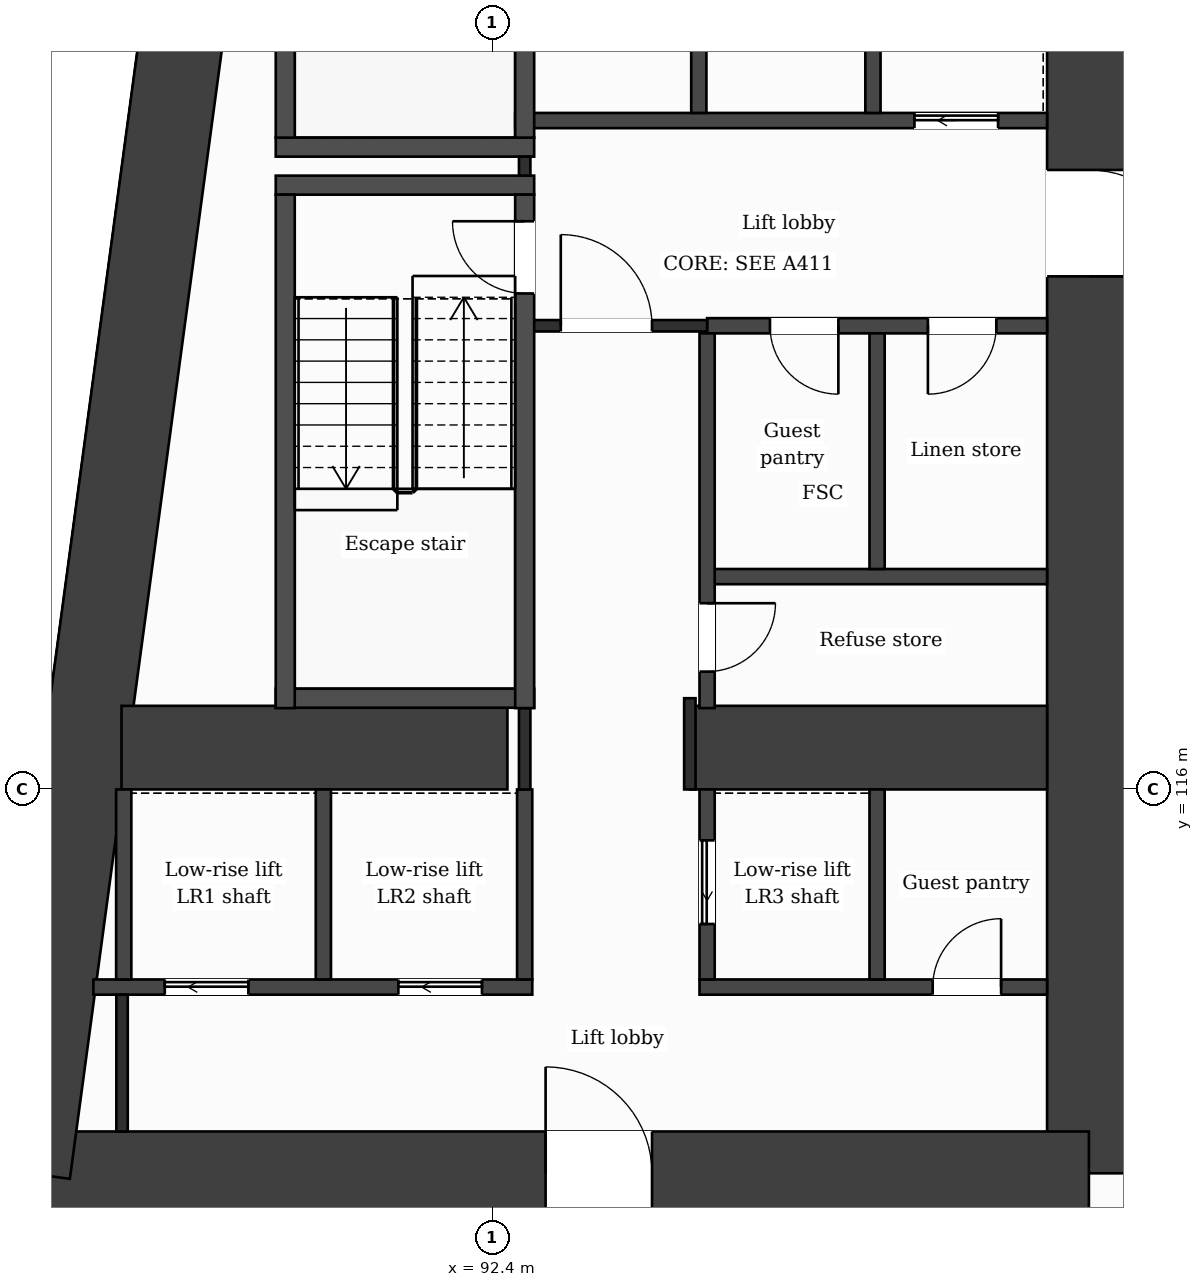
"""IFC4 building model, lengths in metres.
Left out: names, types, materials, properties, quantities, classifications, styles, units other than length and angle.
Written with IfcOpenShell. Run it as: python <this file> out.ifc"""

import sys

from ifc_helpers import new_model, si_unit, direction, frame, frame_2d, origin, place, context, subcontext, project, spatial, rectangle, extrude, element, fill, save


model = new_model("IFC4")
c1 = context("Model", 3, precision=1e-05, world=origin(), true_north=direction((0.0, 1.0)))
c2 = subcontext(c1, "Body", "Model", "MODEL_VIEW")
j1 = project(units=[si_unit("LENGTHUNIT", "METRE"), si_unit("PLANEANGLEUNIT", "RADIAN")], contexts=[c1])
p1 = place(None, origin())
s1 = spatial("IfcSite", under=j1, at=p1, CompositionType="ELEMENT")
p2 = place(p1, origin())
s2 = spatial("IfcBuilding", under=s1, at=p2, CompositionType="ELEMENT")
p3 = place(p2, frame((0.0, 0.0, 53.0)))
s3 = spatial("IfcBuildingStorey", under=s2, at=p3, CompositionType="ELEMENT", Elevation=53.0)
p4 = place(p3, frame((100.25, 131.85, 0.0), z_axis=(0.0, 0.0, 1.0), x_axis=(0.0, -1.0, 0.0)))
e1 = element("IfcWall", 1, at=p4, inside=s3, PredefinedType="SHEAR", context=c2, shape_type="SweptSolid", body=[
    extrude(rectangle(XDim=20.9, YDim=1.1, at=frame_2d((10.45, 0.0))), origin(), (0.0, 0.0, 1.0), 3.5),
])
p5 = place(p4, frame((7.7, 0.0, 0.0)))
e2 = element("IfcOpeningElement", 2, at=p5, cuts=e1, PredefinedType="OPENING", context=c2, shape_type="SweptSolid", body=[
    extrude(rectangle(XDim=1.4, YDim=2.1, at=frame_2d((0.7, 1.05))), frame((0.0, 0.56, 0.0), z_axis=(0.0, -1.0, 0.0), x_axis=(1.0, 0.0, 0.0)), (0.0, 0.0, 1.0), 1.12),
])
p6 = place(p3, frame((100.25, 110.95, 0.0), z_axis=(0.0, 0.0, 1.0), x_axis=(-1.0, 0.0, 0.0)))
e3 = element("IfcWall", 3, at=p6, inside=s3, PredefinedType="SHEAR", context=c2, shape_type="SweptSolid", body=[
    extrude(rectangle(XDim=13.952, YDim=1.1, at=frame_2d((6.976, 0.0))), origin(), (0.0, 0.0, 1.0), 3.5),
])
p7 = place(p6, frame((5.748, 0.0, 0.0)))
e4 = element("IfcOpeningElement", 4, at=p7, cuts=e3, PredefinedType="OPENING", context=c2, shape_type="SweptSolid", body=[
    extrude(rectangle(XDim=1.4, YDim=2.1, at=frame_2d((0.7, 1.05))), frame((0.0, 0.56, 0.0), z_axis=(0.0, -1.0, 0.0), x_axis=(1.0, 0.0, 0.0)), (0.0, 0.0, 1.0), 1.12),
])
p8 = place(p3, frame((86.298, 110.95, 0.0), z_axis=(0.0, 0.0, 1.0), x_axis=(0.133400422634, 0.99106222168, 0.0)))
e5 = element("IfcWall", 5, at=p8, inside=s3, PredefinedType="SHEAR", context=c2, shape_type="SweptSolid", body=[
    extrude(rectangle(XDim=21.089, YDim=1.1, at=frame_2d((10.544, 0.0))), origin(), (0.0, 0.0, 1.0), 3.5),
])
p9 = place(p3, frame((87.523, 116.55, 0.0), z_axis=(0.0, 0.0, 1.0), x_axis=(1.0, 0.0, 0.0)))
e6 = element("IfcWall", 6, at=p9, inside=s3, PredefinedType="SHEAR", context=c2, shape_type="SweptSolid", body=[
    extrude(rectangle(XDim=5.077, YDim=1.1, at=frame_2d((2.539, 0.0))), origin(), (0.0, 0.0, 1.0), 3.5),
])
p10 = place(p3, frame((95.0, 116.55, 0.0), z_axis=(0.0, 0.0, 1.0), x_axis=(1.0, 0.0, 0.0)))
e7 = element("IfcWall", 7, at=p10, inside=s3, PredefinedType="SHEAR", context=c2, shape_type="SweptSolid", body=[
    extrude(rectangle(XDim=4.7, YDim=1.1, at=frame_2d((2.35, 0.0))), origin(), (0.0, 0.0, 1.0), 3.5),
])
p11 = place(p3, frame((87.153, 113.4, 0.0), z_axis=(0.0, 0.0, 1.0), x_axis=(1.0, 0.0, 0.0)))
e8 = element("IfcWall", 8, at=p11, inside=s3, PredefinedType="PARTITIONING", context=c2, shape_type="SweptSolid", body=[
    extrude(rectangle(XDim=5.774, YDim=0.2, at=frame_2d((2.887, 0.0))), origin(), (0.0, 0.0, 1.0), 3.18),
])
p12 = place(p11, frame((0.939, 0.0, 0.0)))
e9 = element("IfcOpeningElement", 9, at=p12, cuts=e8, PredefinedType="OPENING", context=c2, shape_type="SweptSolid", body=[
    extrude(rectangle(XDim=1.1, YDim=2.1, at=frame_2d((0.55, 1.05))), frame((0.0, 0.11, 0.0), z_axis=(0.0, -1.0, 0.0), x_axis=(1.0, 0.0, 0.0)), (0.0, 0.0, 1.0), 0.22),
])
p13 = place(p11, frame((4.012, 0.0, 0.0)))
e10 = element("IfcOpeningElement", 10, at=p13, cuts=e8, PredefinedType="OPENING", context=c2, shape_type="SweptSolid", body=[
    extrude(rectangle(XDim=1.1, YDim=2.1, at=frame_2d((0.55, 1.05))), frame((0.0, 0.11, 0.0), z_axis=(0.0, -1.0, 0.0), x_axis=(1.0, 0.0, 0.0)), (0.0, 0.0, 1.0), 0.22),
])
p14 = place(p3, frame((95.127, 113.4, 0.0), z_axis=(0.0, 0.0, 1.0), x_axis=(1.0, 0.0, 0.0)))
e11 = element("IfcWall", 11, at=p14, inside=s3, PredefinedType="PARTITIONING", context=c2, shape_type="SweptSolid", body=[
    extrude(rectangle(XDim=4.573, YDim=0.2, at=frame_2d((2.287, 0.0))), origin(), (0.0, 0.0, 1.0), 3.18),
])
p15 = place(p14, frame((3.068, 0.0, 0.0)))
e12 = element("IfcOpeningElement", 12, at=p15, cuts=e11, PredefinedType="OPENING", context=c2, shape_type="SweptSolid", body=[
    extrude(rectangle(XDim=0.9, YDim=2.1, at=frame_2d((0.45, 1.05))), frame((0.0, 0.11, 0.0), z_axis=(0.0, -1.0, 0.0), x_axis=(1.0, 0.0, 0.0)), (0.0, 0.0, 1.0), 0.22),
])
p16 = place(p3, frame((89.552, 117.2, 0.0), z_axis=(0.0, 0.0, 1.0), x_axis=(1.0, 0.0, 0.0)))
e13 = element("IfcWall", 13, at=p16, inside=s3, PredefinedType="PARTITIONING", context=c2, shape_type="SweptSolid", body=[
    extrude(rectangle(XDim=3.4, YDim=0.25, at=frame_2d((1.7, 0.0))), origin(), (0.0, 0.0, 1.0), 3.18),
])
p17 = place(p3, frame((95.227, 118.8, 0.0), z_axis=(0.0, 0.0, 1.0), x_axis=(1.0, 0.0, 0.0)))
e14 = element("IfcWall", 14, at=p17, inside=s3, PredefinedType="PARTITIONING", context=c2, shape_type="SweptSolid", body=[
    extrude(rectangle(XDim=4.473, YDim=0.2, at=frame_2d((2.236, 0.0))), origin(), (0.0, 0.0, 1.0), 3.18),
])
p18 = place(p3, frame((95.227, 122.1, 0.0), z_axis=(0.0, 0.0, 1.0), x_axis=(1.0, 0.0, 0.0)))
e15 = element("IfcWall", 15, at=p18, inside=s3, PredefinedType="PARTITIONING", context=c2, shape_type="SweptSolid", body=[
    extrude(rectangle(XDim=4.473, YDim=0.2, at=frame_2d((2.236, 0.0))), origin(), (0.0, 0.0, 1.0), 3.18),
])
p19 = place(p18, frame((0.827, 0.0, 0.0)))
e16 = element("IfcOpeningElement", 16, at=p19, cuts=e15, PredefinedType="OPENING", context=c2, shape_type="SweptSolid", body=[
    extrude(rectangle(XDim=0.9, YDim=2.1, at=frame_2d((0.45, 1.05))), frame((0.0, 0.11, 0.0), z_axis=(0.0, -1.0, 0.0), x_axis=(1.0, 0.0, 0.0)), (0.0, 0.0, 1.0), 0.22),
])
p20 = place(p18, frame((2.905, 0.0, 0.0)))
e17 = element("IfcOpeningElement", 17, at=p20, cuts=e15, PredefinedType="OPENING", context=c2, shape_type="SweptSolid", body=[
    extrude(rectangle(XDim=0.9, YDim=2.1, at=frame_2d((0.45, 1.05))), frame((0.0, 0.11, 0.0), z_axis=(0.0, -1.0, 0.0), x_axis=(1.0, 0.0, 0.0)), (0.0, 0.0, 1.0), 0.22),
])
p21 = place(p3, frame((92.827, 122.1, 0.0), z_axis=(0.0, 0.0, 1.0), x_axis=(1.0, 0.0, 0.0)))
e18 = element("IfcWall", 18, at=p21, inside=s3, PredefinedType="PARTITIONING", context=c2, shape_type="SweptSolid", body=[
    extrude(rectangle(XDim=2.4, YDim=0.15, at=frame_2d((1.2, 0.0))), origin(), (0.0, 0.0, 1.0), 3.18),
])
p22 = place(p21, frame((0.475, 0.0, 0.0)))
e19 = element("IfcOpeningElement", 19, at=p22, cuts=e18, PredefinedType="OPENING", context=c2, shape_type="SweptSolid", body=[
    extrude(rectangle(XDim=1.2, YDim=2.1, at=frame_2d((0.6, 1.05))), frame((0.0, 0.085, 0.0), z_axis=(0.0, -1.0, 0.0), x_axis=(1.0, 0.0, 0.0)), (0.0, 0.0, 1.0), 0.17),
])
for number, where, z_axis, x_axis in (
    (20, (89.552, 123.95, 0.0), (0.0, 0.0, 1.0), (1.0, 0.0, 0.0)),
    (21, (89.552, 124.45, 0.0), (0.0, 0.0, 1.0), (1.0, 0.0, 0.0)),
):
    element("IfcWall", number, at=place(p3, frame(where, z_axis=z_axis, x_axis=x_axis)), inside=s3, PredefinedType="PARTITIONING", context=c2, shape_type="SweptSolid", body=[
        extrude(rectangle(XDim=3.4, YDim=0.25, at=frame_2d((1.7, 0.0))), origin(), (0.0, 0.0, 1.0), 3.18),
    ])
p23 = place(p3, frame((92.702, 124.8, 0.0), z_axis=(0.0, 0.0, 1.0), x_axis=(1.0, 0.0, 0.0)))
e22 = element("IfcWall", 22, at=p23, inside=s3, PredefinedType="PARTITIONING", context=c2, shape_type="SweptSolid", body=[
    extrude(rectangle(XDim=6.998, YDim=0.2, at=frame_2d((3.499, 0.0))), origin(), (0.0, 0.0, 1.0), 3.18),
])
p24 = place(p23, frame((5.253, 0.0, 0.0)))
e23 = element("IfcOpeningElement", 23, at=p24, cuts=e22, PredefinedType="OPENING", context=c2, shape_type="SweptSolid", body=[
    extrude(rectangle(XDim=1.1, YDim=2.1, at=frame_2d((0.55, 1.05))), frame((0.0, 0.11, 0.0), z_axis=(0.0, -1.0, 0.0), x_axis=(1.0, 0.0, 0.0)), (0.0, 0.0, 1.0), 0.22),
])
p25 = place(p3, frame((87.552, 113.5, 0.0), z_axis=(0.0, 0.0, 1.0), x_axis=(0.0, 1.0, 0.0)))
e24 = element("IfcWall", 24, at=p25, inside=s3, PredefinedType="PARTITIONING", context=c2, shape_type="SweptSolid", body=[
    extrude(rectangle(XDim=2.5, YDim=0.2, at=frame_2d((1.25, 0.0))), origin(), (0.0, 0.0, 1.0), 3.18),
])
p26 = place(p3, frame((87.53, 111.5, 0.0), z_axis=(0.0, 0.0, 1.0), x_axis=(0.0, 1.0, 0.0)))
e25 = element("IfcWall", 25, at=p26, inside=s3, PredefinedType="PARTITIONING", context=c2, shape_type="SweptSolid", body=[
    extrude(rectangle(XDim=1.8, YDim=0.15, at=frame_2d((0.9, 0.0))), origin(), (0.0, 0.0, 1.0), 3.18),
])
p27 = place(p3, frame((89.677, 117.07, 0.0), z_axis=(0.0, 0.0, 1.0), x_axis=(0.0, 1.0, 0.0)))
e26 = element("IfcWall", 26, at=p27, inside=s3, PredefinedType="PARTITIONING", context=c2, shape_type="SweptSolid", body=[
    extrude(rectangle(XDim=6.755, YDim=0.25, at=frame_2d((3.377, 0.0))), origin(), (0.0, 0.0, 1.0), 3.18),
])
p28 = place(p3, frame((89.677, 124.575, 0.0), z_axis=(0.0, 0.0, 1.0), x_axis=(0.0, 1.0, 0.0)))
e27 = element("IfcWall", 27, at=p28, inside=s3, PredefinedType="PARTITIONING", context=c2, shape_type="SweptSolid", body=[
    extrude(rectangle(XDim=6.5, YDim=0.25, at=frame_2d((3.25, 0.0))), origin(), (0.0, 0.0, 1.0), 3.18),
])
for number, where, z_axis, x_axis in (
    (28, (90.178, 113.5, 0.0), (0.0, 0.0, 1.0), (0.0, 1.0, 0.0)),
    (29, (92.827, 113.5, 0.0), (0.0, 0.0, 1.0), (0.0, 1.0, 0.0)),
):
    element("IfcWall", number, at=place(p3, frame(where, z_axis=z_axis, x_axis=x_axis)), inside=s3, PredefinedType="PARTITIONING", context=c2, shape_type="SweptSolid", body=[
        extrude(rectangle(XDim=2.5, YDim=0.2, at=frame_2d((1.25, 0.0))), origin(), (0.0, 0.0, 1.0), 3.18),
    ])
p29 = place(p3, frame((92.827, 116.0, 0.0), z_axis=(0.0, 0.0, 1.0), x_axis=(0.0, 1.0, 0.0)))
e30 = element("IfcWall", 30, at=p29, inside=s3, PredefinedType="PARTITIONING", context=c2, shape_type="SweptSolid", body=[
    extrude(rectangle(XDim=1.07, YDim=0.15, at=frame_2d((0.535, 0.0))), origin(), (0.0, 0.0, 1.0), 3.18),
])
p30 = place(p3, frame((92.827, 124.075, 0.0), z_axis=(0.0, 0.0, 1.0), x_axis=(0.0, 1.0, 0.0)))
e31 = element("IfcWall", 31, at=p30, inside=s3, PredefinedType="PARTITIONING", context=c2, shape_type="SweptSolid", body=[
    extrude(rectangle(XDim=0.25, YDim=0.15, at=frame_2d((0.125, 0.0))), origin(), (0.0, 0.0, 1.0), 3.18),
])
p31 = place(p3, frame((92.827, 117.07, 0.0), z_axis=(0.0, 0.0, 1.0), x_axis=(0.0, 1.0, 0.0)))
e32 = element("IfcWall", 32, at=p31, inside=s3, PredefinedType="PARTITIONING", context=c2, shape_type="SweptSolid", body=[
    extrude(rectangle(XDim=6.755, YDim=0.25, at=frame_2d((3.377, 0.0))), origin(), (0.0, 0.0, 1.0), 3.18),
])
p32 = place(p31, frame((5.455, 0.0, 0.0)))
e33 = element("IfcOpeningElement", 33, at=p32, cuts=e32, PredefinedType="OPENING", context=c2, shape_type="SweptSolid", body=[
    extrude(rectangle(XDim=0.95, YDim=2.1, at=frame_2d((0.475, 1.05))), frame((0.0, 0.135, 0.0), z_axis=(0.0, -1.0, 0.0), x_axis=(1.0, 0.0, 0.0)), (0.0, 0.0, 1.0), 0.27),
])
p33 = place(p3, frame((92.827, 124.575, 0.0), z_axis=(0.0, 0.0, 1.0), x_axis=(0.0, 1.0, 0.0)))
e34 = element("IfcWall", 34, at=p33, inside=s3, PredefinedType="PARTITIONING", context=c2, shape_type="SweptSolid", body=[
    extrude(rectangle(XDim=6.755, YDim=0.25, at=frame_2d((3.377, 0.0))), origin(), (0.0, 0.0, 1.0), 3.18),
])
p34 = place(p33, frame((5.325, 0.0, 0.0)))
e35 = element("IfcOpeningElement", 35, at=p34, cuts=e34, PredefinedType="OPENING", context=c2, shape_type="SweptSolid", body=[
    extrude(rectangle(XDim=1.0, YDim=2.1, at=frame_2d((0.5, 1.05))), frame((0.0, 0.135, 0.0), z_axis=(0.0, -1.0, 0.0), x_axis=(1.0, 0.0, 0.0)), (0.0, 0.0, 1.0), 0.27),
])
p35 = place(p3, frame((95.0, 116.0, 0.0), z_axis=(0.0, 0.0, 1.0), x_axis=(0.0, 1.0, 0.0)))
e36 = element("IfcWall", 36, at=p35, inside=s3, PredefinedType="PARTITIONING", context=c2, shape_type="SweptSolid", body=[
    extrude(rectangle(XDim=1.2, YDim=0.15, at=frame_2d((0.6, 0.0))), origin(), (0.0, 0.0, 1.0), 3.18),
])
p36 = place(p3, frame((95.118, 124.9, 0.0), z_axis=(0.0, 0.0, 1.0), x_axis=(0.0, 1.0, 0.0)))
e37 = element("IfcWall", 37, at=p36, inside=s3, PredefinedType="PARTITIONING", context=c2, shape_type="SweptSolid", body=[
    extrude(rectangle(XDim=3.1, YDim=0.2, at=frame_2d((1.55, 0.0))), origin(), (0.0, 0.0, 1.0), 3.18),
])
p37 = place(p3, frame((95.227, 113.5, 0.0), z_axis=(0.0, 0.0, 1.0), x_axis=(0.0, 1.0, 0.0)))
e38 = element("IfcWall", 38, at=p37, inside=s3, PredefinedType="PARTITIONING", context=c2, shape_type="SweptSolid", body=[
    extrude(rectangle(XDim=2.5, YDim=0.2, at=frame_2d((1.25, 0.0))), origin(), (0.0, 0.0, 1.0), 3.18),
])
p38 = place(p37, frame((0.73, 0.0, 0.0)))
e39 = element("IfcOpeningElement", 39, at=p38, cuts=e38, PredefinedType="OPENING", context=c2, shape_type="SweptSolid", body=[
    extrude(rectangle(XDim=1.1, YDim=2.1, at=frame_2d((0.55, 1.05))), frame((0.0, 0.11, 0.0), z_axis=(0.0, -1.0, 0.0), x_axis=(1.0, 0.0, 0.0)), (0.0, 0.0, 1.0), 0.22),
])
p39 = place(p3, frame((95.227, 117.07, 0.0), z_axis=(0.0, 0.0, 1.0), x_axis=(0.0, 1.0, 0.0)))
e40 = element("IfcWall", 40, at=p39, inside=s3, PredefinedType="PARTITIONING", context=c2, shape_type="SweptSolid", body=[
    extrude(rectangle(XDim=4.93, YDim=0.2, at=frame_2d((2.465, 0.0))), origin(), (0.0, 0.0, 1.0), 3.18),
])
p40 = place(p39, frame((0.48, 0.0, 0.0)))
e41 = element("IfcOpeningElement", 41, at=p40, cuts=e40, PredefinedType="OPENING", context=c2, shape_type="SweptSolid", body=[
    extrude(rectangle(XDim=0.9, YDim=2.1, at=frame_2d((0.45, 1.05))), frame((0.0, 0.11, 0.0), z_axis=(0.0, -1.0, 0.0), x_axis=(1.0, 0.0, 0.0)), (0.0, 0.0, 1.0), 0.22),
])
p41 = place(p3, frame((97.409, 124.9, 0.0), z_axis=(0.0, 0.0, 1.0), x_axis=(0.0, 1.0, 0.0)))
e42 = element("IfcWall", 42, at=p41, inside=s3, PredefinedType="PARTITIONING", context=c2, shape_type="SweptSolid", body=[
    extrude(rectangle(XDim=3.1, YDim=0.2, at=frame_2d((1.55, 0.0))), origin(), (0.0, 0.0, 1.0), 3.18),
])
p42 = place(p3, frame((97.463, 113.5, 0.0), z_axis=(0.0, 0.0, 1.0), x_axis=(0.0, 1.0, 0.0)))
e43 = element("IfcWall", 43, at=p42, inside=s3, PredefinedType="PARTITIONING", context=c2, shape_type="SweptSolid", body=[
    extrude(rectangle(XDim=2.5, YDim=0.2, at=frame_2d((1.25, 0.0))), origin(), (0.0, 0.0, 1.0), 3.18),
])
p43 = place(p3, frame((97.463, 118.9, 0.0), z_axis=(0.0, 0.0, 1.0), x_axis=(0.0, 1.0, 0.0)))
e44 = element("IfcWall", 44, at=p43, inside=s3, PredefinedType="PARTITIONING", context=c2, shape_type="SweptSolid", body=[
    extrude(rectangle(XDim=3.1, YDim=0.2, at=frame_2d((1.55, 0.0))), origin(), (0.0, 0.0, 1.0), 3.18),
])
p44 = place(p22, origin())
e45 = element("IfcDoor", 45, at=p44, inside=s3, OperationType="SINGLE_SWING_LEFT", PredefinedType="DOOR", context=c2, shape_type="SweptSolid", body=[
    extrude(rectangle(XDim=1.2, YDim=2.1, at=frame_2d((0.6, 1.05))), frame((0.0, 0.025, 0.0), z_axis=(0.0, -1.0, 0.0), x_axis=(1.0, 0.0, 0.0)), (0.0, 0.0, 1.0), 0.05),
])
fill(e19, e45)
p45 = place(p24, origin())
e46 = element("IfcDoor", 46, at=p45, inside=s3, OperationType="SLIDING_TO_LEFT", PredefinedType="DOOR", context=c2, shape_type="SweptSolid", body=[
    extrude(rectangle(XDim=1.1, YDim=2.1, at=frame_2d((0.55, 1.05))), frame((0.0, 0.025, 0.0), z_axis=(0.0, -1.0, 0.0), x_axis=(1.0, 0.0, 0.0)), (0.0, 0.0, 1.0), 0.05),
])
fill(e23, e46)
p46 = place(p19, origin())
e47 = element("IfcDoor", 47, at=p46, inside=s3, OperationType="SINGLE_SWING_RIGHT", PredefinedType="DOOR", context=c2, shape_type="SweptSolid", body=[
    extrude(rectangle(XDim=0.9, YDim=2.1, at=frame_2d((0.45, 1.05))), frame((0.0, 0.025, 0.0), z_axis=(0.0, -1.0, 0.0), x_axis=(1.0, 0.0, 0.0)), (0.0, 0.0, 1.0), 0.05),
])
fill(e16, e47)
p47 = place(p20, origin())
e48 = element("IfcDoor", 48, at=p47, inside=s3, OperationType="SINGLE_SWING_LEFT", PredefinedType="DOOR", context=c2, shape_type="SweptSolid", body=[
    extrude(rectangle(XDim=0.9, YDim=2.1, at=frame_2d((0.45, 1.05))), frame((0.0, 0.025, 0.0), z_axis=(0.0, -1.0, 0.0), x_axis=(1.0, 0.0, 0.0)), (0.0, 0.0, 1.0), 0.05),
])
fill(e17, e48)
p48 = place(p32, origin())
e49 = element("IfcDoor", 49, at=p48, inside=s3, OperationType="SINGLE_SWING_RIGHT", PredefinedType="DOOR", context=c2, shape_type="SweptSolid", body=[
    extrude(rectangle(XDim=0.95, YDim=2.1, at=frame_2d((0.475, 1.05))), frame((0.0, 0.025, 0.0), z_axis=(0.0, -1.0, 0.0), x_axis=(1.0, 0.0, 0.0)), (0.0, 0.0, 1.0), 0.05),
])
fill(e33, e49)
p49 = place(p40, origin())
e50 = element("IfcDoor", 50, at=p49, inside=s3, OperationType="SINGLE_SWING_RIGHT", PredefinedType="DOOR", context=c2, shape_type="SweptSolid", body=[
    extrude(rectangle(XDim=0.9, YDim=2.1, at=frame_2d((0.45, 1.05))), frame((0.0, 0.025, 0.0), z_axis=(0.0, -1.0, 0.0), x_axis=(1.0, 0.0, 0.0)), (0.0, 0.0, 1.0), 0.05),
])
fill(e41, e50)
p50 = place(p12, origin())
e51 = element("IfcDoor", 51, at=p50, inside=s3, OperationType="SLIDING_TO_LEFT", PredefinedType="DOOR", context=c2, shape_type="SweptSolid", body=[
    extrude(rectangle(XDim=1.1, YDim=2.1, at=frame_2d((0.55, 1.05))), frame((0.0, 0.025, 0.0), z_axis=(0.0, -1.0, 0.0), x_axis=(1.0, 0.0, 0.0)), (0.0, 0.0, 1.0), 0.05),
])
fill(e9, e51)
p51 = place(p13, origin())
e52 = element("IfcDoor", 52, at=p51, inside=s3, OperationType="SLIDING_TO_LEFT", PredefinedType="DOOR", context=c2, shape_type="SweptSolid", body=[
    extrude(rectangle(XDim=1.1, YDim=2.1, at=frame_2d((0.55, 1.05))), frame((0.0, 0.025, 0.0), z_axis=(0.0, -1.0, 0.0), x_axis=(1.0, 0.0, 0.0)), (0.0, 0.0, 1.0), 0.05),
])
fill(e10, e52)
p52 = place(p38, origin())
e53 = element("IfcDoor", 53, at=p52, inside=s3, OperationType="SLIDING_TO_LEFT", PredefinedType="DOOR", context=c2, shape_type="SweptSolid", body=[
    extrude(rectangle(XDim=1.1, YDim=2.1, at=frame_2d((0.55, 1.05))), frame((0.0, 0.025, 0.0), z_axis=(0.0, -1.0, 0.0), x_axis=(1.0, 0.0, 0.0)), (0.0, 0.0, 1.0), 0.05),
])
fill(e39, e53)
p53 = place(p15, origin())
e54 = element("IfcDoor", 54, at=p53, inside=s3, OperationType="SINGLE_SWING_RIGHT", PredefinedType="DOOR", context=c2, shape_type="SweptSolid", body=[
    extrude(rectangle(XDim=0.9, YDim=2.1, at=frame_2d((0.45, 1.05))), frame((0.0, 0.025, 0.0), z_axis=(0.0, -1.0, 0.0), x_axis=(1.0, 0.0, 0.0)), (0.0, 0.0, 1.0), 0.05),
])
fill(e12, e54)
p54 = place(p7, origin())
e55 = element("IfcDoor", 55, at=p54, inside=s3, OperationType="SINGLE_SWING_RIGHT", PredefinedType="DOOR", context=c2, shape_type="SweptSolid", body=[
    extrude(rectangle(XDim=1.4, YDim=2.1, at=frame_2d((0.7, 1.05))), frame((0.0, 0.025, 0.0), z_axis=(0.0, -1.0, 0.0), x_axis=(1.0, 0.0, 0.0)), (0.0, 0.0, 1.0), 0.05),
])
fill(e4, e55)
p55 = place(p5, origin())
e56 = element("IfcDoor", 56, at=p55, inside=s3, OperationType="SINGLE_SWING_RIGHT", PredefinedType="DOOR", context=c2, shape_type="SweptSolid", body=[
    extrude(rectangle(XDim=1.4, YDim=2.1, at=frame_2d((0.7, 1.05))), frame((0.0, 0.025, 0.0), z_axis=(0.0, -1.0, 0.0), x_axis=(1.0, 0.0, 0.0)), (0.0, 0.0, 1.0), 0.05),
])
fill(e2, e56)
save(model, sys.argv[1])
